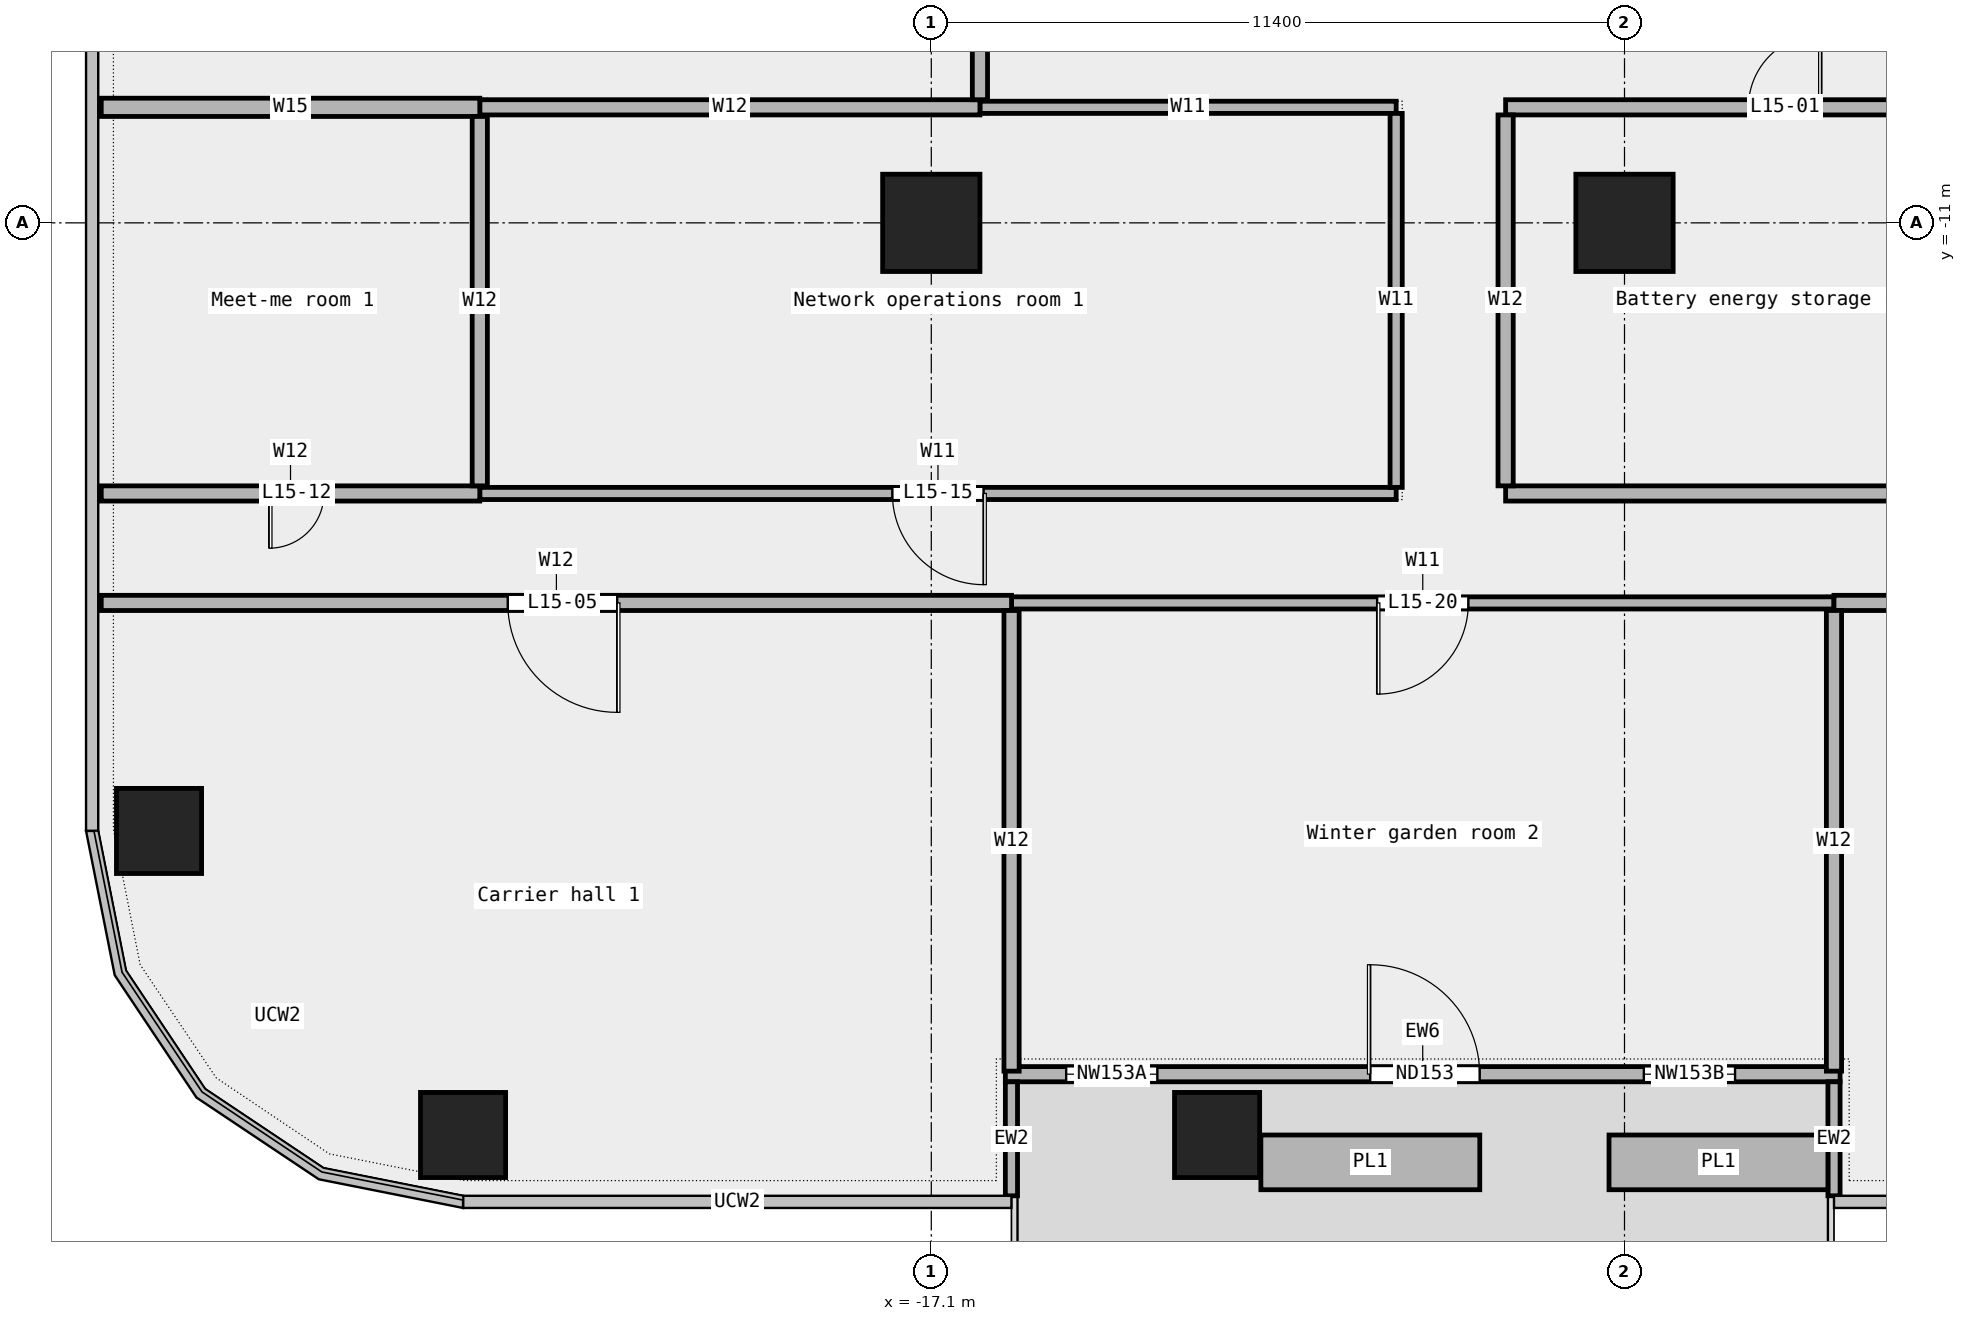
"""IFC4 building model, lengths in metres.
Left out: names, types, materials, properties, quantities, classifications, styles, units other than length and angle.
Written with IfcOpenShell. Run it as: python <this file> out.ifc"""

import sys

from ifc_helpers import new_model, si_unit, direction, frame, frame_2d, origin, origin_2d, place, context, subcontext, project, spatial, rectangle, extrude, element, fill, save


model = new_model("IFC4")
c1 = context("Model", 3, precision=1e-05, world=origin(), true_north=direction((0.0, 1.0)))
c2 = subcontext(c1, "Body", "Model", "MODEL_VIEW")
j1 = project(units=[si_unit("LENGTHUNIT", "METRE"), si_unit("PLANEANGLEUNIT", "RADIAN")], contexts=[c1])
p1 = place(None, origin())
s1 = spatial("IfcSite", under=j1, at=p1, CompositionType="ELEMENT")
p2 = place(p1, origin())
s2 = spatial("IfcBuilding", under=s1, at=p2, CompositionType="ELEMENT")
p3 = place(p2, frame((0.0, 0.0, 79.0)))
s3 = spatial("IfcBuildingStorey", under=s2, at=p3, CompositionType="ELEMENT", Elevation=79.0)
for number, where, z_axis, x_axis in (
    (1, (-24.8, -26.0, 0.0), (0.0, 0.0, 1.0), (1.0, 0.0, 0.0)),
    (2, (-12.4, -26.0, 0.0), (0.0, 0.0, 1.0), (1.0, 0.0, 0.0)),
    (3, (-29.8, -21.0, 0.0), (0.0, 0.0, 1.0), (1.0, 0.0, 0.0)),
):
    element("IfcColumn", number, at=place(p3, frame(where, z_axis=z_axis, x_axis=x_axis)), inside=s3, PredefinedType="COLUMN", context=c2, shape_type="SweptSolid", body=[
        extrude(rectangle(XDim=1.4, YDim=1.4, at=origin_2d()), origin(), (0.0, 0.0, 1.0), 4.35),
    ])
for number, where, z_axis, x_axis in (
    (4, (-17.1, -11.0, 0.0), (0.0, 0.0, 1.0), (1.0, 0.0, 0.0)),
    (5, (-5.7, -11.0, 0.0), (0.0, 0.0, 1.0), (1.0, 0.0, 0.0)),
):
    element("IfcColumn", number, at=place(p3, frame(where, z_axis=z_axis, x_axis=x_axis)), inside=s3, PredefinedType="COLUMN", context=c2, shape_type="SweptSolid", body=[
        extrude(rectangle(XDim=1.6, YDim=1.6, at=origin_2d()), origin(), (0.0, 0.0, 1.0), 4.35),
    ])
p4 = place(p3, frame((-15.882, -25.0, 0.0), z_axis=(0.0, 0.0, 1.0), x_axis=(1.0, 0.0, 0.0)))
e6 = element("IfcWall", 6, at=p4, inside=s3, PredefinedType="STANDARD", context=c2, shape_type="SweptSolid", body=[
    extrude(rectangle(XDim=13.727, YDim=0.25, at=frame_2d((6.864, 0.0))), origin(), (0.0, 0.0, 1.0), 4.35),
])
p5 = place(p4, frame((1.0, 0.0, 0.45)))
e7 = element("IfcOpeningElement", 7, at=p5, cuts=e6, PredefinedType="OPENING", context=c2, shape_type="SweptSolid", body=[
    extrude(rectangle(XDim=1.5, YDim=3.0, at=frame_2d((0.75, 1.5))), frame((0.0, 0.137, 0.0), z_axis=(0.0, -1.0, 0.0), x_axis=(1.0, 0.0, 0.0)), (0.0, 0.0, 1.0), 0.274),
])
p6 = place(p4, frame((6.0, 0.0, 0.0)))
e8 = element("IfcOpeningElement", 8, at=p6, cuts=e6, PredefinedType="OPENING", context=c2, shape_type="SweptSolid", body=[
    extrude(rectangle(XDim=1.8, YDim=2.4, at=frame_2d((0.9, 1.2))), frame((0.0, 0.137, 0.0), z_axis=(0.0, -1.0, 0.0), x_axis=(1.0, 0.0, 0.0)), (0.0, 0.0, 1.0), 0.274),
])
p7 = place(p4, frame((10.5, 0.0, 0.45)))
e9 = element("IfcOpeningElement", 9, at=p7, cuts=e6, PredefinedType="OPENING", context=c2, shape_type="SweptSolid", body=[
    extrude(rectangle(XDim=1.5, YDim=3.0, at=frame_2d((0.75, 1.5))), frame((0.0, 0.137, 0.0), z_axis=(0.0, -1.0, 0.0), x_axis=(1.0, 0.0, 0.0)), (0.0, 0.0, 1.0), 0.274),
])
for number, where, z_axis, x_axis in (
    (10, (-15.782, -27.0, 0.0), (0.0, 0.0, 1.0), (0.0, 1.0, 0.0)),
    (11, (-2.255, -27.0, 0.0), (0.0, 0.0, 1.0), (0.0, 1.0, 0.0)),
):
    element("IfcWall", number, at=place(p3, frame(where, z_axis=z_axis, x_axis=x_axis)), inside=s3, PredefinedType="STANDARD", context=c2, shape_type="SweptSolid", body=[
        extrude(rectangle(XDim=1.875, YDim=0.2, at=frame_2d((0.938, 0.0))), origin(), (0.0, 0.0, 1.0), 4.35),
    ])
for number, where, z_axis, x_axis in (
    (12, (-11.68, -26.45, 0.0), (0.0, 0.0, 1.0), (1.0, 0.0, 0.0)),
    (13, (-5.955, -26.45, 0.0), (0.0, 0.0, 1.0), (1.0, 0.0, 0.0)),
):
    element("IfcWall", number, at=place(p3, frame(where, z_axis=z_axis, x_axis=x_axis)), inside=s3, PredefinedType="STANDARD", context=c2, shape_type="SweptSolid", body=[
        extrude(rectangle(XDim=3.6, YDim=0.9, at=frame_2d((1.8, 0.0))), origin(), (0.0, 0.0, 1.0), 0.7),
    ])
p8 = place(p3, frame((-15.78, -17.25, 0.0), z_axis=(0.0, 0.0, 1.0), x_axis=(1.0, 0.0, 0.0)))
e14 = element("IfcWall", 14, at=p8, inside=s3, PredefinedType="PARTITIONING", context=c2, shape_type="SweptSolid", body=[
    extrude(rectangle(XDim=13.525, YDim=0.2, at=frame_2d((6.763, 0.0))), origin(), (0.0, 0.0, 1.0), 4.35),
])
p9 = place(p8, frame((6.012, 0.0, 0.0)))
e15 = element("IfcOpeningElement", 15, at=p9, cuts=e14, PredefinedType="OPENING", context=c2, shape_type="SweptSolid", body=[
    extrude(rectangle(XDim=1.5, YDim=2.1, at=frame_2d((0.75, 1.05))), frame((0.0, 0.112, 0.0), z_axis=(0.0, -1.0, 0.0), x_axis=(1.0, 0.0, 0.0)), (0.0, 0.0, 1.0), 0.224),
])
p10 = place(p3, frame((-30.75, -17.25, 0.0), z_axis=(0.0, 0.0, 1.0), x_axis=(1.0, 0.0, 0.0)))
e16 = element("IfcWall", 16, at=p10, inside=s3, PredefinedType="PARTITIONING", context=c2, shape_type="SweptSolid", body=[
    extrude(rectangle(XDim=14.97, YDim=0.25, at=frame_2d((7.485, 0.0))), origin(), (0.0, 0.0, 1.0), 4.35),
])
p11 = place(p10, frame((6.685, 0.0, 0.0)))
e17 = element("IfcOpeningElement", 17, at=p11, cuts=e16, PredefinedType="OPENING", context=c2, shape_type="SweptSolid", body=[
    extrude(rectangle(XDim=1.8, YDim=2.1, at=frame_2d((0.9, 1.05))), frame((0.0, 0.137, 0.0), z_axis=(0.0, -1.0, 0.0), x_axis=(1.0, 0.0, 0.0)), (0.0, 0.0, 1.0), 0.274),
])
p12 = place(p3, frame((-2.255, -17.25, 0.0), z_axis=(0.0, 0.0, 1.0), x_axis=(1.0, 0.0, 0.0)))
e18 = element("IfcWall", 18, at=p12, inside=s3, PredefinedType="PARTITIONING", context=c2, shape_type="SweptSolid", body=[
    extrude(rectangle(XDim=33.005, YDim=0.25, at=frame_2d((16.502, 0.0))), origin(), (0.0, 0.0, 1.0), 4.35),
])
p13 = place(p12, frame((7.025, 0.0, 0.0)))
e19 = element("IfcOpeningElement", 19, at=p13, cuts=e18, PredefinedType="OPENING", context=c2, shape_type="SweptSolid", body=[
    extrude(rectangle(XDim=1.8, YDim=2.1, at=frame_2d((0.9, 1.05))), frame((0.0, 0.137, 0.0), z_axis=(0.0, -1.0, 0.0), x_axis=(1.0, 0.0, 0.0)), (0.0, 0.0, 1.0), 0.274),
])
p14 = place(p12, frame((23.427, 0.0, 0.0)))
e20 = element("IfcOpeningElement", 20, at=p14, cuts=e18, PredefinedType="OPENING", context=c2, shape_type="SweptSolid", body=[
    extrude(rectangle(XDim=1.8, YDim=2.1, at=frame_2d((0.9, 1.05))), frame((0.0, 0.137, 0.0), z_axis=(0.0, -1.0, 0.0), x_axis=(1.0, 0.0, 0.0)), (0.0, 0.0, 1.0), 0.274),
])
p15 = place(p3, frame((-24.525, -15.45, 0.0), z_axis=(0.0, 0.0, 1.0), x_axis=(1.0, 0.0, 0.0)))
e21 = element("IfcWall", 21, at=p15, inside=s3, PredefinedType="PARTITIONING", context=c2, shape_type="SweptSolid", body=[
    extrude(rectangle(XDim=15.07, YDim=0.2, at=frame_2d((7.535, 0.0))), origin(), (0.0, 0.0, 1.0), 4.35),
])
p16 = place(p15, frame((6.785, 0.0, 0.0)))
e22 = element("IfcOpeningElement", 22, at=p16, cuts=e21, PredefinedType="OPENING", context=c2, shape_type="SweptSolid", body=[
    extrude(rectangle(XDim=1.5, YDim=2.1, at=frame_2d((0.75, 1.05))), frame((0.0, 0.112, 0.0), z_axis=(0.0, -1.0, 0.0), x_axis=(1.0, 0.0, 0.0)), (0.0, 0.0, 1.0), 0.224),
])
p17 = place(p3, frame((-30.75, -15.45, 0.0), z_axis=(0.0, 0.0, 1.0), x_axis=(1.0, 0.0, 0.0)))
e23 = element("IfcWall", 23, at=p17, inside=s3, PredefinedType="PARTITIONING", context=c2, shape_type="SweptSolid", body=[
    extrude(rectangle(XDim=6.225, YDim=0.25, at=frame_2d((3.113, 0.0))), origin(), (0.0, 0.0, 1.0), 4.35),
])
p18 = place(p17, frame((2.762, 0.0, 0.0)))
e24 = element("IfcOpeningElement", 24, at=p18, cuts=e23, PredefinedType="OPENING", context=c2, shape_type="SweptSolid", body=[
    extrude(rectangle(XDim=0.9, YDim=2.1, at=frame_2d((0.45, 1.05))), frame((0.0, 0.137, 0.0), z_axis=(0.0, -1.0, 0.0), x_axis=(1.0, 0.0, 0.0)), (0.0, 0.0, 1.0), 0.274),
])
p19 = place(p3, frame((-7.655, -15.45, 0.0), z_axis=(0.0, 0.0, 1.0), x_axis=(1.0, 0.0, 0.0)))
e25 = element("IfcWall", 25, at=p19, inside=s3, PredefinedType="PARTITIONING", context=c2, shape_type="SweptSolid", body=[
    extrude(rectangle(XDim=18.365, YDim=0.25, at=frame_2d((9.183, 0.0))), origin(), (0.0, 0.0, 1.0), 4.35),
])
p20 = place(p3, frame((-16.3, -9.1, 0.0), z_axis=(0.0, 0.0, 1.0), x_axis=(1.0, 0.0, 0.0)))
e26 = element("IfcWall", 26, at=p20, inside=s3, PredefinedType="PARTITIONING", context=c2, shape_type="SweptSolid", body=[
    extrude(rectangle(XDim=6.845, YDim=0.2, at=frame_2d((3.422, 0.0))), origin(), (0.0, 0.0, 1.0), 4.35),
])
p21 = place(p3, frame((-24.525, -9.1, 0.0), z_axis=(0.0, 0.0, 1.0), x_axis=(1.0, 0.0, 0.0)))
e27 = element("IfcWall", 27, at=p21, inside=s3, PredefinedType="PARTITIONING", context=c2, shape_type="SweptSolid", body=[
    extrude(rectangle(XDim=8.225, YDim=0.25, at=frame_2d((4.112, 0.0))), origin(), (0.0, 0.0, 1.0), 4.35),
])
p22 = place(p3, frame((-7.655, -9.1, 0.0), z_axis=(0.0, 0.0, 1.0), x_axis=(1.0, 0.0, 0.0)))
e28 = element("IfcWall", 28, at=p22, inside=s3, PredefinedType="PARTITIONING", context=c2, shape_type="SweptSolid", body=[
    extrude(rectangle(XDim=18.365, YDim=0.25, at=frame_2d((9.183, 0.0))), origin(), (0.0, 0.0, 1.0), 4.35),
])
p23 = place(p22, frame((3.992, 0.0, 0.0)))
e29 = element("IfcOpeningElement", 29, at=p23, cuts=e28, PredefinedType="OPENING", context=c2, shape_type="SweptSolid", body=[
    extrude(rectangle(XDim=1.2, YDim=2.1, at=frame_2d((0.6, 1.05))), frame((0.0, 0.137, 0.0), z_axis=(0.0, -1.0, 0.0), x_axis=(1.0, 0.0, 0.0)), (0.0, 0.0, 1.0), 0.274),
])
p24 = place(p22, frame((14.375, 0.0, 0.0)))
e30 = element("IfcOpeningElement", 30, at=p24, cuts=e28, PredefinedType="OPENING", context=c2, shape_type="SweptSolid", body=[
    extrude(rectangle(XDim=1.2, YDim=2.1, at=frame_2d((0.6, 1.05))), frame((0.0, 0.137, 0.0), z_axis=(0.0, -1.0, 0.0), x_axis=(1.0, 0.0, 0.0)), (0.0, 0.0, 1.0), 0.274),
])
p25 = place(p3, frame((-30.75, -9.1, 0.0), z_axis=(0.0, 0.0, 1.0), x_axis=(1.0, 0.0, 0.0)))
e31 = element("IfcWall", 31, at=p25, inside=s3, PredefinedType="PARTITIONING", context=c2, shape_type="SweptSolid", body=[
    extrude(rectangle(XDim=6.225, YDim=0.3, at=frame_2d((3.113, 0.0))), origin(), (0.0, 0.0, 1.0), 4.35),
])
p26 = place(p3, frame((-24.525, -15.325, 0.0), z_axis=(0.0, 0.0, 1.0), x_axis=(0.0, 1.0, 0.0)))
e32 = element("IfcWall", 32, at=p26, inside=s3, PredefinedType="PARTITIONING", context=c2, shape_type="SweptSolid", body=[
    extrude(rectangle(XDim=6.075, YDim=0.25, at=frame_2d((3.038, 0.0))), origin(), (0.0, 0.0, 1.0), 4.35),
])
p27 = place(p3, frame((-16.3, -8.975, 0.0), z_axis=(0.0, 0.0, 1.0), x_axis=(0.0, 1.0, 0.0)))
e33 = element("IfcWall", 33, at=p27, inside=s3, PredefinedType="PARTITIONING", context=c2, shape_type="SweptSolid", body=[
    extrude(rectangle(XDim=8.175, YDim=0.25, at=frame_2d((4.087, 0.0))), origin(), (0.0, 0.0, 1.0), 4.35),
])
p28 = place(p27, frame((3.188, 0.0, 0.0)))
e34 = element("IfcOpeningElement", 34, at=p28, cuts=e33, PredefinedType="OPENING", context=c2, shape_type="SweptSolid", body=[
    extrude(rectangle(XDim=1.8, YDim=2.1, at=frame_2d((0.9, 1.05))), frame((0.0, 0.137, 0.0), z_axis=(0.0, -1.0, 0.0), x_axis=(1.0, 0.0, 0.0)), (0.0, 0.0, 1.0), 0.274),
])
p29 = place(p3, frame((-15.78, -24.95, 0.0), z_axis=(0.0, 0.0, 1.0), x_axis=(0.0, 1.0, 0.0)))
e35 = element("IfcWall", 35, at=p29, inside=s3, PredefinedType="PARTITIONING", context=c2, shape_type="SweptSolid", body=[
    extrude(rectangle(XDim=7.575, YDim=0.25, at=frame_2d((3.788, 0.0))), origin(), (0.0, 0.0, 1.0), 4.35),
])
p30 = place(p3, frame((-9.455, -15.35, 0.0), z_axis=(0.0, 0.0, 1.0), x_axis=(0.0, 1.0, 0.0)))
e36 = element("IfcWall", 36, at=p30, inside=s3, PredefinedType="PARTITIONING", context=c2, shape_type="SweptSolid", body=[
    extrude(rectangle(XDim=6.15, YDim=0.2, at=frame_2d((3.075, 0.0))), origin(), (0.0, 0.0, 1.0), 4.35),
])
p31 = place(p3, frame((-7.655, -15.325, 0.0), z_axis=(0.0, 0.0, 1.0), x_axis=(0.0, 1.0, 0.0)))
e37 = element("IfcWall", 37, at=p31, inside=s3, PredefinedType="PARTITIONING", context=c2, shape_type="SweptSolid", body=[
    extrude(rectangle(XDim=6.1, YDim=0.25, at=frame_2d((3.05, 0.0))), origin(), (0.0, 0.0, 1.0), 4.35),
])
p32 = place(p3, frame((-2.255, -24.95, 0.0), z_axis=(0.0, 0.0, 1.0), x_axis=(0.0, 1.0, 0.0)))
e38 = element("IfcWall", 38, at=p32, inside=s3, PredefinedType="PARTITIONING", context=c2, shape_type="SweptSolid", body=[
    extrude(rectangle(XDim=7.575, YDim=0.25, at=frame_2d((3.788, 0.0))), origin(), (0.0, 0.0, 1.0), 4.35),
])
p33 = place(p5, origin())
e39 = element("IfcWindow", 39, at=p33, inside=s3, PartitioningType="SINGLE_PANEL", PredefinedType="WINDOW", context=c2, shape_type="SweptSolid", body=[
    extrude(rectangle(XDim=1.5, YDim=3.0, at=frame_2d((0.75, 1.5))), frame((0.0, 0.03, 0.0), z_axis=(0.0, -1.0, 0.0), x_axis=(1.0, 0.0, 0.0)), (0.0, 0.0, 1.0), 0.06),
])
fill(e7, e39)
p34 = place(p6, origin())
e40 = element("IfcDoor", 40, at=p34, inside=s3, OperationType="DOUBLE_DOOR_SINGLE_SWING", PredefinedType="DOOR", context=c2, shape_type="SweptSolid", body=[
    extrude(rectangle(XDim=1.8, YDim=2.4, at=frame_2d((0.9, 1.2))), frame((0.0, 0.025, 0.0), z_axis=(0.0, -1.0, 0.0), x_axis=(1.0, 0.0, 0.0)), (0.0, 0.0, 1.0), 0.05),
])
fill(e8, e40)
p35 = place(p7, origin())
e41 = element("IfcWindow", 41, at=p35, inside=s3, PartitioningType="SINGLE_PANEL", PredefinedType="WINDOW", context=c2, shape_type="SweptSolid", body=[
    extrude(rectangle(XDim=1.5, YDim=3.0, at=frame_2d((0.75, 1.5))), frame((0.0, 0.03, 0.0), z_axis=(0.0, -1.0, 0.0), x_axis=(1.0, 0.0, 0.0)), (0.0, 0.0, 1.0), 0.06),
])
fill(e9, e41)
p36 = place(p23, origin())
e42 = element("IfcDoor", 42, at=p36, inside=s3, OperationType="SINGLE_SWING_RIGHT", PredefinedType="DOOR", context=c2, shape_type="SweptSolid", body=[
    extrude(rectangle(XDim=1.2, YDim=2.1, at=frame_2d((0.6, 1.05))), frame((0.0, 0.025, 0.0), z_axis=(0.0, -1.0, 0.0), x_axis=(1.0, 0.0, 0.0)), (0.0, 0.0, 1.0), 0.05),
])
fill(e29, e42)
p37 = place(p11, origin())
e43 = element("IfcDoor", 43, at=p37, inside=s3, OperationType="DOUBLE_DOOR_SINGLE_SWING", PredefinedType="DOOR", context=c2, shape_type="SweptSolid", body=[
    extrude(rectangle(XDim=1.8, YDim=2.1, at=frame_2d((0.9, 1.05))), frame((0.0, 0.025, 0.0), z_axis=(0.0, -1.0, 0.0), x_axis=(1.0, 0.0, 0.0)), (0.0, 0.0, 1.0), 0.05),
])
fill(e17, e43)
p38 = place(p18, origin())
e44 = element("IfcDoor", 44, at=p38, inside=s3, OperationType="SINGLE_SWING_RIGHT", PredefinedType="DOOR", context=c2, shape_type="SweptSolid", body=[
    extrude(rectangle(XDim=0.9, YDim=2.1, at=frame_2d((0.45, 1.05))), frame((0.0, 0.025, 0.0), z_axis=(0.0, -1.0, 0.0), x_axis=(1.0, 0.0, 0.0)), (0.0, 0.0, 1.0), 0.05),
])
fill(e24, e44)
p39 = place(p16, origin())
e45 = element("IfcDoor", 45, at=p39, inside=s3, OperationType="DOUBLE_DOOR_SINGLE_SWING", PredefinedType="DOOR", context=c2, shape_type="SweptSolid", body=[
    extrude(rectangle(XDim=1.5, YDim=2.1, at=frame_2d((0.75, 1.05))), frame((0.0, 0.025, 0.0), z_axis=(0.0, -1.0, 0.0), x_axis=(1.0, 0.0, 0.0)), (0.0, 0.0, 1.0), 0.05),
])
fill(e22, e45)
p40 = place(p9, origin())
e46 = element("IfcDoor", 46, at=p40, inside=s3, OperationType="DOUBLE_DOOR_SINGLE_SWING", PredefinedType="DOOR", context=c2, shape_type="SweptSolid", body=[
    extrude(rectangle(XDim=1.5, YDim=2.1, at=frame_2d((0.75, 1.05))), frame((0.0, 0.025, 0.0), z_axis=(0.0, -1.0, 0.0), x_axis=(1.0, 0.0, 0.0)), (0.0, 0.0, 1.0), 0.05),
])
fill(e15, e46)
save(model, sys.argv[1])
